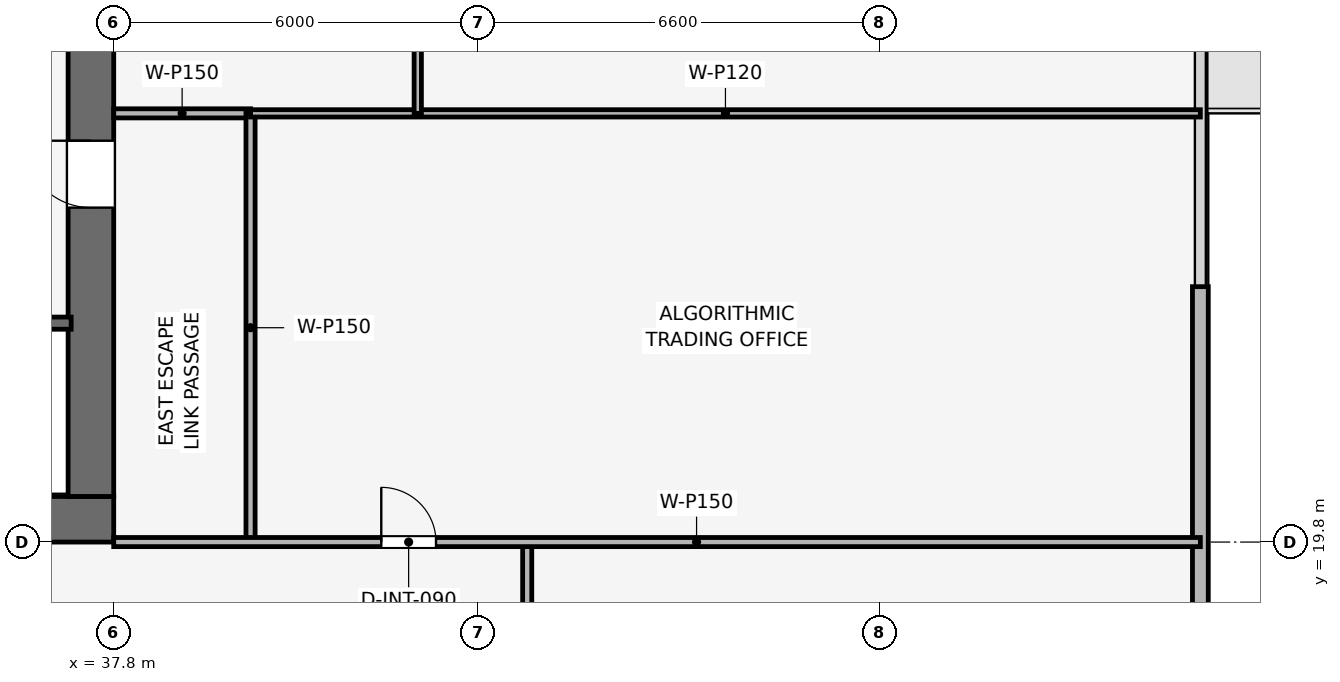
"""IFC4 building model, lengths in metres.
Left out: names, types, materials, properties, quantities, classifications, styles, units other than length and angle.
Written with IfcOpenShell. Run it as: python <this file> out.ifc"""

import sys

from ifc_helpers import new_model, si_unit, direction, frame, frame_2d, origin, place, context, subcontext, project, spatial, rectangle, extrude, element, fill, save


model = new_model("IFC4")
c1 = context("Model", 3, precision=1e-05, world=origin(), true_north=direction((0.0, 1.0)))
c2 = subcontext(c1, "Body", "Model", "MODEL_VIEW")
j1 = project(units=[si_unit("LENGTHUNIT", "METRE"), si_unit("PLANEANGLEUNIT", "RADIAN")], contexts=[c1])
p1 = place(None, origin())
s1 = spatial("IfcSite", under=j1, at=p1, CompositionType="ELEMENT")
p2 = place(p1, origin())
s2 = spatial("IfcBuilding", under=s1, at=p2, CompositionType="ELEMENT")
p3 = place(p2, frame((0.0, 0.0, 211.2)))
s3 = spatial("IfcBuildingStorey", under=s2, at=p3, CompositionType="ELEMENT", Elevation=211.2)
p4 = place(p3, frame((19.8, 20.175, 0.0), z_axis=(0.0, 0.0, 1.0), x_axis=(1.0, 0.0, 0.0)))
e1 = element("IfcWall", 1, at=p4, inside=s3, PredefinedType="SHEAR", context=c2, shape_type="SweptSolid", body=[
    extrude(rectangle(XDim=18.0, YDim=0.75, at=frame_2d((9.0, 0.0))), origin(), (0.0, 0.0, 1.0), 3.75),
])
p5 = place(p4, frame((8.4, 0.0, 0.0)))
e2 = element("IfcOpeningElement", 2, at=p5, cuts=e1, PredefinedType="OPENING", context=c2, shape_type="SweptSolid", body=[
    extrude(rectangle(XDim=1.2, YDim=2.2, at=frame_2d((0.6, 1.1))), frame((0.0, 0.385, 0.0), z_axis=(0.0, -1.0, 0.0), x_axis=(1.0, 0.0, 0.0)), (0.0, 0.0, 1.0), 0.77),
])
p6 = place(p3, frame((37.425, 20.55, 0.0), z_axis=(0.0, 0.0, 1.0), x_axis=(0.0, 1.0, 0.0)))
e3 = element("IfcWall", 3, at=p6, inside=s3, PredefinedType="SHEAR", context=c2, shape_type="SweptSolid", body=[
    extrude(rectangle(XDim=16.5, YDim=0.75, at=frame_2d((8.25, 0.0))), origin(), (0.0, 0.0, 1.0), 3.75),
])
p7 = place(p6, frame((4.75, 0.0, 0.0)))
e4 = element("IfcOpeningElement", 4, at=p7, cuts=e3, PredefinedType="OPENING", context=c2, shape_type="SweptSolid", body=[
    extrude(rectangle(XDim=1.1, YDim=2.15, at=frame_2d((0.55, 1.075))), frame((0.0, 0.385, 0.0), z_axis=(0.0, -1.0, 0.0), x_axis=(1.0, 0.0, 0.0)), (0.0, 0.0, 1.0), 0.77),
])
p8 = place(p3, frame((55.67, 24.0, 0.0), z_axis=(0.0, 0.0, 1.0), x_axis=(0.0, -1.0, 0.0)))
e5 = element("IfcWall", 5, at=p8, inside=s3, PredefinedType="SOLIDWALL", context=c2, shape_type="SweptSolid", body=[
    extrude(rectangle(XDim=14.7, YDim=0.26, at=frame_2d((7.35, 0.0))), origin(), (0.0, 0.0, 1.0), 3.5),
])
p9 = place(p8, frame((10.65, 0.0, 0.9)))
e6 = element("IfcOpeningElement", 6, at=p9, cuts=e5, PredefinedType="OPENING", context=c2, shape_type="SweptSolid", body=[
    extrude(rectangle(XDim=3.8, YDim=1.9, at=frame_2d((1.9, 0.95))), frame((0.0, 0.14, 0.0), z_axis=(0.0, -1.0, 0.0), x_axis=(1.0, 0.0, 0.0)), (0.0, 0.0, 1.0), 0.28),
])
p10 = place(p3, frame((34.05, 23.4, 0.0), z_axis=(0.0, 0.0, 1.0), x_axis=(1.0, 0.0, 0.0)))
e7 = element("IfcWall", 7, at=p10, inside=s3, PredefinedType="SHEAR", context=c2, shape_type="SweptSolid", body=[
    extrude(rectangle(XDim=3.05, YDim=0.2, at=frame_2d((1.525, 0.0))), origin(), (0.0, 0.0, 1.0), 3.5),
])
p11 = place(p10, frame((1.2, 0.0, 0.0)))
e8 = element("IfcOpeningElement", 8, at=p11, cuts=e7, PredefinedType="OPENING", context=c2, shape_type="SweptSolid", body=[
    extrude(rectangle(XDim=1.1, YDim=2.15, at=frame_2d((0.55, 1.075))), frame((0.0, 0.11, 0.0), z_axis=(0.0, -1.0, 0.0), x_axis=(1.0, 0.0, 0.0)), (0.0, 0.0, 1.0), 0.22),
])
p12 = place(p3, frame((37.8, 26.85, 0.0), z_axis=(0.0, 0.0, 1.0), x_axis=(1.0, 0.0, 0.0)))
e9 = element("IfcWall", 9, at=p12, inside=s3, PredefinedType="PARTITIONING", context=c2, shape_type="SweptSolid", body=[
    extrude(rectangle(XDim=2.25, YDim=0.15, at=frame_2d((1.125, 0.0))), origin(), (0.0, 0.0, 1.0), 3.5),
])
p13 = place(p3, frame((40.05, 19.8, 0.0), z_axis=(0.0, 0.0, 1.0), x_axis=(0.0, 1.0, 0.0)))
e10 = element("IfcWall", 10, at=p13, inside=s3, PredefinedType="PARTITIONING", context=c2, shape_type="SweptSolid", body=[
    extrude(rectangle(XDim=7.05, YDim=0.15, at=frame_2d((3.525, 0.0))), origin(), (0.0, 0.0, 1.0), 3.035),
])
p14 = place(p3, frame((40.05, 26.85, 0.0), z_axis=(0.0, 0.0, 1.0), x_axis=(1.0, 0.0, 0.0)))
e11 = element("IfcWall", 11, at=p14, inside=s3, PredefinedType="PARTITIONING", context=c2, shape_type="SweptSolid", body=[
    extrude(rectangle(XDim=15.62, YDim=0.12, at=frame_2d((7.81, 0.0))), origin(), (0.0, 0.0, 1.0), 2.885),
])
p15 = place(p3, frame((42.8, 26.85, 0.0), z_axis=(0.0, 0.0, 1.0), x_axis=(0.0, 1.0, 0.0)))
e12 = element("IfcWall", 12, at=p15, inside=s3, PredefinedType="PARTITIONING", context=c2, shape_type="SweptSolid", body=[
    extrude(rectangle(XDim=10.95, YDim=0.12, at=frame_2d((5.475, 0.0))), origin(), (0.0, 0.0, 1.0), 3.035),
])
p16 = place(p15, frame((5.025, 0.0, 0.0)))
e13 = element("IfcOpeningElement", 13, at=p16, cuts=e12, PredefinedType="OPENING", context=c2, shape_type="SweptSolid", body=[
    extrude(rectangle(XDim=0.9, YDim=2.1, at=frame_2d((0.45, 1.05))), frame((0.0, 0.07, 0.0), z_axis=(0.0, -1.0, 0.0), x_axis=(1.0, 0.0, 0.0)), (0.0, 0.0, 1.0), 0.14),
])
p17 = place(p3, frame((44.6, 17.4, 0.0), z_axis=(0.0, 0.0, 1.0), x_axis=(0.0, 1.0, 0.0)))
e14 = element("IfcWall", 14, at=p17, inside=s3, PredefinedType="PARTITIONING", context=c2, shape_type="SweptSolid", body=[
    extrude(rectangle(XDim=2.4, YDim=0.15, at=frame_2d((1.2, 0.0))), origin(), (0.0, 0.0, 1.0), 3.5),
])
p18 = place(p3, frame((37.8, 19.8, 0.0), z_axis=(0.0, 0.0, 1.0), x_axis=(1.0, 0.0, 0.0)))
e15 = element("IfcWall", 15, at=p18, inside=s3, PredefinedType="PARTITIONING", context=c2, shape_type="SweptSolid", body=[
    extrude(rectangle(XDim=17.87, YDim=0.15, at=frame_2d((8.935, 0.0))), origin(), (0.0, 0.0, 1.0), 2.885),
])
p19 = place(p18, frame((4.4, 0.0, 0.0)))
e16 = element("IfcOpeningElement", 16, at=p19, cuts=e15, PredefinedType="OPENING", context=c2, shape_type="SweptSolid", body=[
    extrude(rectangle(XDim=0.9, YDim=2.1, at=frame_2d((0.45, 1.05))), frame((0.0, 0.085, 0.0), z_axis=(0.0, -1.0, 0.0), x_axis=(1.0, 0.0, 0.0)), (0.0, 0.0, 1.0), 0.17),
])
p20 = place(p19, origin())
e17 = element("IfcDoor", 17, at=p20, inside=s3, OperationType="SINGLE_SWING_LEFT", PredefinedType="DOOR", context=c2, shape_type="SweptSolid", body=[
    extrude(rectangle(XDim=0.9, YDim=2.1, at=frame_2d((0.45, 1.05))), frame((0.0, 0.025, 0.0), z_axis=(0.0, -1.0, 0.0), x_axis=(1.0, 0.0, 0.0)), (0.0, 0.0, 1.0), 0.05),
])
fill(e16, e17)
p21 = place(p7, origin())
e18 = element("IfcDoor", 18, at=p21, inside=s3, OperationType="SINGLE_SWING_RIGHT", PredefinedType="DOOR", context=c2, shape_type="SweptSolid", body=[
    extrude(rectangle(XDim=1.1, YDim=2.15, at=frame_2d((0.55, 1.075))), frame((0.0, 0.025, 0.0), z_axis=(0.0, -1.0, 0.0), x_axis=(1.0, 0.0, 0.0)), (0.0, 0.0, 1.0), 0.05),
])
fill(e4, e18)
save(model, sys.argv[1])
